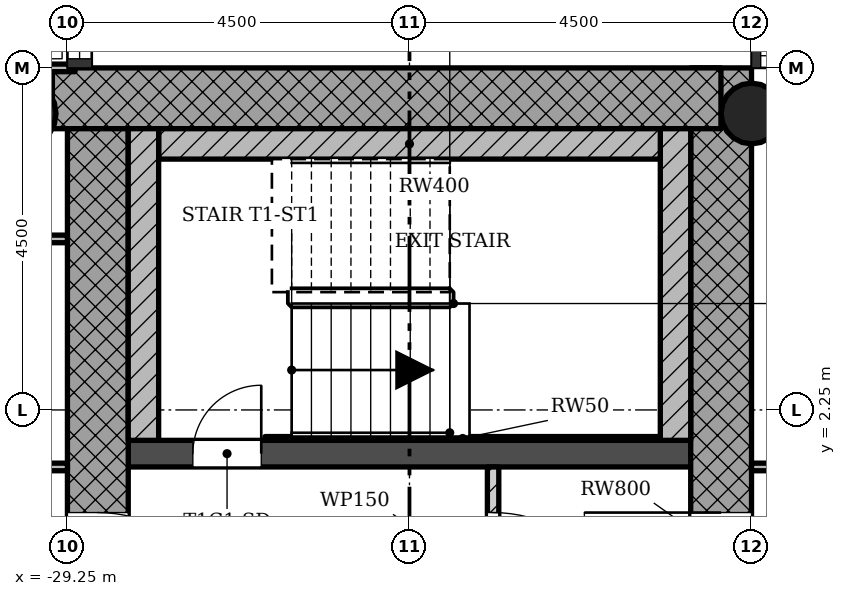
"""IFC4 building model, lengths in metres.
Left out: names, types, materials, properties, quantities, classifications, styles, units other than length and angle.
Written with IfcOpenShell. Run it as: python <this file> out.ifc"""

import sys

from ifc_helpers import new_model, si_unit, direction, frame, frame_2d, origin, origin_2d, place, context, subcontext, project, spatial, rectangle, hollow_circle, extrude, element, fill, save


model = new_model("IFC4")
c1 = context("Model", 3, precision=1e-05, world=origin(), true_north=direction((0.0, 1.0)))
c2 = subcontext(c1, "Body", "Model", "MODEL_VIEW")
j1 = project(units=[si_unit("LENGTHUNIT", "METRE"), si_unit("PLANEANGLEUNIT", "RADIAN")], contexts=[c1])
p1 = place(None, origin())
s1 = spatial("IfcSite", under=j1, at=p1, CompositionType="ELEMENT")
p2 = place(p1, origin())
s2 = spatial("IfcBuilding", under=s1, at=p2, CompositionType="ELEMENT")
p3 = place(p2, frame((0.0, 0.0, 143.9)))
s3 = spatial("IfcBuildingStorey", under=s2, at=p3, CompositionType="ELEMENT", Elevation=143.9)
p4 = place(p3, frame((-20.65, -5.95, 0.0), z_axis=(0.0, 0.0, 1.0), x_axis=(0.0, 1.0, 0.0)))
e1 = element("IfcWall", 1, at=p4, inside=s3, PredefinedType="SHEAR", context=c2, shape_type="SweptSolid", body=[
    extrude(rectangle(XDim=12.7, YDim=0.8, at=frame_2d((6.35, 0.0))), origin(), (0.0, 0.0, 1.0), 3.4),
])
p5 = place(p4, frame((5.05, 0.0, 0.0)))
e2 = element("IfcOpeningElement", 2, at=p5, cuts=e1, PredefinedType="OPENING", context=c2, shape_type="SweptSolid", body=[
    extrude(rectangle(XDim=1.8, YDim=2.1, at=frame_2d((0.9, 1.05))), frame((0.0, 0.41, 0.0), z_axis=(0.0, -1.0, 0.0), x_axis=(1.0, 0.0, 0.0)), (0.0, 0.0, 1.0), 0.82),
])
p6 = place(p3, frame((-20.652, 6.35, 0.0), z_axis=(0.0, 0.0, 1.0), x_axis=(-1.0, 0.0, 0.0)))
e3 = element("IfcWall", 3, at=p6, inside=s3, PredefinedType="SHEAR", context=c2, shape_type="SweptSolid", body=[
    extrude(rectangle(XDim=8.796, YDim=0.8, at=frame_2d((4.398, 0.0))), origin(), (0.0, 0.0, 1.0), 3.4),
])
p7 = place(p3, frame((-28.85, 5.95, 0.0), z_axis=(0.0, 0.0, 1.0), x_axis=(0.0, -1.0, 0.0)))
e4 = element("IfcWall", 4, at=p7, inside=s3, PredefinedType="SHEAR", context=c2, shape_type="SweptSolid", body=[
    extrude(rectangle(XDim=12.7, YDim=0.8, at=frame_2d((6.35, 0.0))), origin(), (0.0, 0.0, 1.0), 3.4),
])
p8 = place(p7, frame((5.05, 0.0, 0.0)))
e5 = element("IfcOpeningElement", 5, at=p8, cuts=e4, PredefinedType="OPENING", context=c2, shape_type="SweptSolid", body=[
    extrude(rectangle(XDim=1.8, YDim=2.1, at=frame_2d((0.9, 1.05))), frame((0.0, 0.41, 0.0), z_axis=(0.0, -1.0, 0.0), x_axis=(1.0, 0.0, 0.0)), (0.0, 0.0, 1.0), 0.82),
])
p9 = place(p3, frame((-28.45, 1.675, 0.0), z_axis=(0.0, 0.0, 1.0), x_axis=(1.0, 0.0, 0.0)))
e6 = element("IfcWall", 6, at=p9, inside=s3, PredefinedType="SHEAR", context=c2, shape_type="SweptSolid", body=[
    extrude(rectangle(XDim=7.4, YDim=0.35, at=frame_2d((3.7, 0.0))), origin(), (0.0, 0.0, 1.0), 3.4),
])
p10 = place(p9, frame((0.85, 0.0, 0.0)))
e7 = element("IfcOpeningElement", 7, at=p10, cuts=e6, PredefinedType="OPENING", context=c2, shape_type="SweptSolid", body=[
    extrude(rectangle(XDim=0.9, YDim=2.1, at=frame_2d((0.45, 1.05))), frame((0.0, 0.185, 0.0), z_axis=(0.0, -1.0, 0.0), x_axis=(1.0, 0.0, 0.0)), (0.0, 0.0, 1.0), 0.37),
])
p11 = place(p3, frame((-20.25, 6.15, 0.0), z_axis=(0.0, 0.0, 1.0), x_axis=(1.0, 0.0, 0.0)))
e8 = element("IfcColumn", 8, at=p11, inside=s3, PredefinedType="COLUMN", context=c2, shape_type="SweptSolid", body=[
    extrude(hollow_circle(Radius=0.4, WallThickness=0.028, at=origin_2d()), origin(), (0.0, 0.0, 1.0), 3.4),
])
p12 = place(p3, frame((-29.85, 6.15, 0.0), z_axis=(0.0, 0.0, 1.0), x_axis=(1.0, 0.0, 0.0)))
e9 = element("IfcColumn", 9, at=p12, inside=s3, PredefinedType="COLUMN", context=c2, shape_type="SweptSolid", body=[
    extrude(hollow_circle(Radius=0.45, WallThickness=0.032, at=origin_2d()), origin(), (0.0, 0.0, 1.0), 3.4),
])
p13 = place(p3, frame((-23.65, -1.5, 0.0), z_axis=(0.0, 0.0, 1.0), x_axis=(0.0, 1.0, 0.0)))
e10 = element("IfcWall", 10, at=p13, inside=s3, PredefinedType="PARTITIONING", context=c2, shape_type="SweptSolid", body=[
    extrude(rectangle(XDim=3.0, YDim=0.15, at=frame_2d((1.5, 0.0))), origin(), (0.0, 0.0, 1.0), 3.0),
])
p14 = place(p13, frame((0.6, 0.0, 0.0)))
e11 = element("IfcOpeningElement", 11, at=p14, cuts=e10, PredefinedType="OPENING", context=c2, shape_type="SweptSolid", body=[
    extrude(rectangle(XDim=1.8, YDim=2.1, at=frame_2d((0.9, 1.05))), frame((0.0, 0.085, 0.0), z_axis=(0.0, -1.0, 0.0), x_axis=(1.0, 0.0, 0.0)), (0.0, 0.0, 1.0), 0.17),
])
p15 = place(p3, frame((-31.5, 1.5, 0.0), z_axis=(0.0, 0.0, 1.0), x_axis=(1.0, 0.0, 0.0)))
e12 = element("IfcWall", 12, at=p15, inside=s3, PredefinedType="PARTITIONING", context=c2, shape_type="SweptSolid", body=[
    extrude(rectangle(XDim=2.25, YDim=0.1, at=frame_2d((1.125, 0.0))), origin(), (0.0, 0.0, 1.0), 3.0),
])
p16 = place(p3, frame((-20.25, 1.5, 0.0), z_axis=(0.0, 0.0, 1.0), x_axis=(1.0, 0.0, 0.0)))
e13 = element("IfcWall", 13, at=p16, inside=s3, PredefinedType="PARTITIONING", context=c2, shape_type="SweptSolid", body=[
    extrude(rectangle(XDim=4.5, YDim=0.1, at=frame_2d((2.25, 0.0))), origin(), (0.0, 0.0, 1.0), 3.0),
])
p17 = place(p16, frame((1.8, 0.0, 0.0)))
e14 = element("IfcOpeningElement", 14, at=p17, cuts=e13, PredefinedType="OPENING", context=c2, shape_type="SweptSolid", body=[
    extrude(rectangle(XDim=0.9, YDim=2.1, at=frame_2d((0.45, 1.05))), frame((0.0, 0.06, 0.0), z_axis=(0.0, -1.0, 0.0), x_axis=(1.0, 0.0, 0.0)), (0.0, 0.0, 1.0), 0.12),
])
p18 = place(p3, frame((-35.1, 4.5, 0.0), z_axis=(0.0, 0.0, 1.0), x_axis=(1.0, 0.0, 0.0)))
e15 = element("IfcWall", 15, at=p18, inside=s3, PredefinedType="PARTITIONING", context=c2, shape_type="SweptSolid", body=[
    extrude(rectangle(XDim=5.85, YDim=0.1, at=frame_2d((2.925, 0.0))), origin(), (0.0, 0.0, 1.0), 3.0),
])
p19 = place(p18, frame((1.35, 0.0, 0.0)))
e16 = element("IfcOpeningElement", 16, at=p19, cuts=e15, PredefinedType="OPENING", context=c2, shape_type="SweptSolid", body=[
    extrude(rectangle(XDim=0.9, YDim=2.1, at=frame_2d((0.45, 1.05))), frame((0.0, 0.06, 0.0), z_axis=(0.0, -1.0, 0.0), x_axis=(1.0, 0.0, 0.0)), (0.0, 0.0, 1.0), 0.12),
])
p20 = place(p3, frame((-35.1, 6.75, 0.0), z_axis=(0.0, 0.0, 1.0), x_axis=(1.0, 0.0, 0.0)))
e17 = element("IfcWall", 17, at=p20, inside=s3, PredefinedType="PARTITIONING", context=c2, shape_type="SweptSolid", body=[
    extrude(rectangle(XDim=5.95, YDim=0.1, at=frame_2d((2.975, 0.0))), origin(), (0.0, 0.0, 1.0), 3.0),
])
p21 = place(p3, frame((-21.25, 1.85, 0.0), z_axis=(0.0, 0.0, 1.0), x_axis=(0.0, 1.0, 0.0)))
e18 = element("IfcWall", 18, at=p21, inside=s3, PredefinedType="SHEAR", context=c2, shape_type="SweptSolid", body=[
    extrude(rectangle(XDim=4.1, YDim=0.4, at=frame_2d((2.05, 0.0))), origin(), (0.0, 0.0, 1.0), 3.4),
])
p22 = place(p3, frame((-28.05, 5.75, 0.0), z_axis=(0.0, 0.0, 1.0), x_axis=(1.0, 0.0, 0.0)))
e19 = element("IfcWall", 19, at=p22, inside=s3, PredefinedType="SHEAR", context=c2, shape_type="SweptSolid", body=[
    extrude(rectangle(XDim=6.6, YDim=0.4, at=frame_2d((3.3, 0.0))), origin(), (0.0, 0.0, 1.0), 3.4),
])
p23 = place(p3, frame((-28.25, 1.85, 0.0), z_axis=(0.0, 0.0, 1.0), x_axis=(0.0, 1.0, 0.0)))
e20 = element("IfcWall", 20, at=p23, inside=s3, PredefinedType="SHEAR", context=c2, shape_type="SweptSolid", body=[
    extrude(rectangle(XDim=4.1, YDim=0.4, at=frame_2d((2.05, 0.0))), origin(), (0.0, 0.0, 1.0), 3.4),
])
p24 = place(p3, frame((-26.65, 1.875, 0.0), z_axis=(0.0, 0.0, 1.0), x_axis=(1.0, 0.0, 0.0)))
e21 = element("IfcWall", 21, at=p24, inside=s3, PredefinedType="SHEAR", context=c2, shape_type="SweptSolid", body=[
    extrude(rectangle(XDim=5.2, YDim=0.05, at=frame_2d((2.6, 0.0))), origin(), (0.0, 0.0, 1.0), 3.4),
])
p25 = place(p14, origin())
e22 = element("IfcDoor", 22, at=p25, inside=s3, OperationType="SINGLE_SWING_LEFT", PredefinedType="DOOR", context=c2, shape_type="SweptSolid", body=[
    extrude(rectangle(XDim=1.8, YDim=2.1, at=frame_2d((0.9, 1.05))), frame((0.0, 0.025, 0.0), z_axis=(0.0, -1.0, 0.0), x_axis=(1.0, 0.0, 0.0)), (0.0, 0.0, 1.0), 0.05),
])
fill(e11, e22)
p26 = place(p10, origin())
e23 = element("IfcDoor", 23, at=p26, inside=s3, OperationType="SINGLE_SWING_LEFT", PredefinedType="DOOR", context=c2, shape_type="SweptSolid", body=[
    extrude(rectangle(XDim=0.9, YDim=2.1, at=frame_2d((0.45, 1.05))), frame((0.0, 0.025, 0.0), z_axis=(0.0, -1.0, 0.0), x_axis=(1.0, 0.0, 0.0)), (0.0, 0.0, 1.0), 0.05),
])
fill(e7, e23)
p27 = place(p8, origin())
e24 = element("IfcDoor", 24, at=p27, inside=s3, OperationType="SINGLE_SWING_LEFT", PredefinedType="DOOR", context=c2, shape_type="SweptSolid", body=[
    extrude(rectangle(XDim=1.8, YDim=2.1, at=frame_2d((0.9, 1.05))), frame((0.0, 0.025, 0.0), z_axis=(0.0, -1.0, 0.0), x_axis=(1.0, 0.0, 0.0)), (0.0, 0.0, 1.0), 0.05),
])
fill(e5, e24)
p28 = place(p5, origin())
e25 = element("IfcDoor", 25, at=p28, inside=s3, OperationType="SINGLE_SWING_LEFT", PredefinedType="DOOR", context=c2, shape_type="SweptSolid", body=[
    extrude(rectangle(XDim=1.8, YDim=2.1, at=frame_2d((0.9, 1.05))), frame((0.0, 0.025, 0.0), z_axis=(0.0, -1.0, 0.0), x_axis=(1.0, 0.0, 0.0)), (0.0, 0.0, 1.0), 0.05),
])
fill(e2, e25)
save(model, sys.argv[1])
